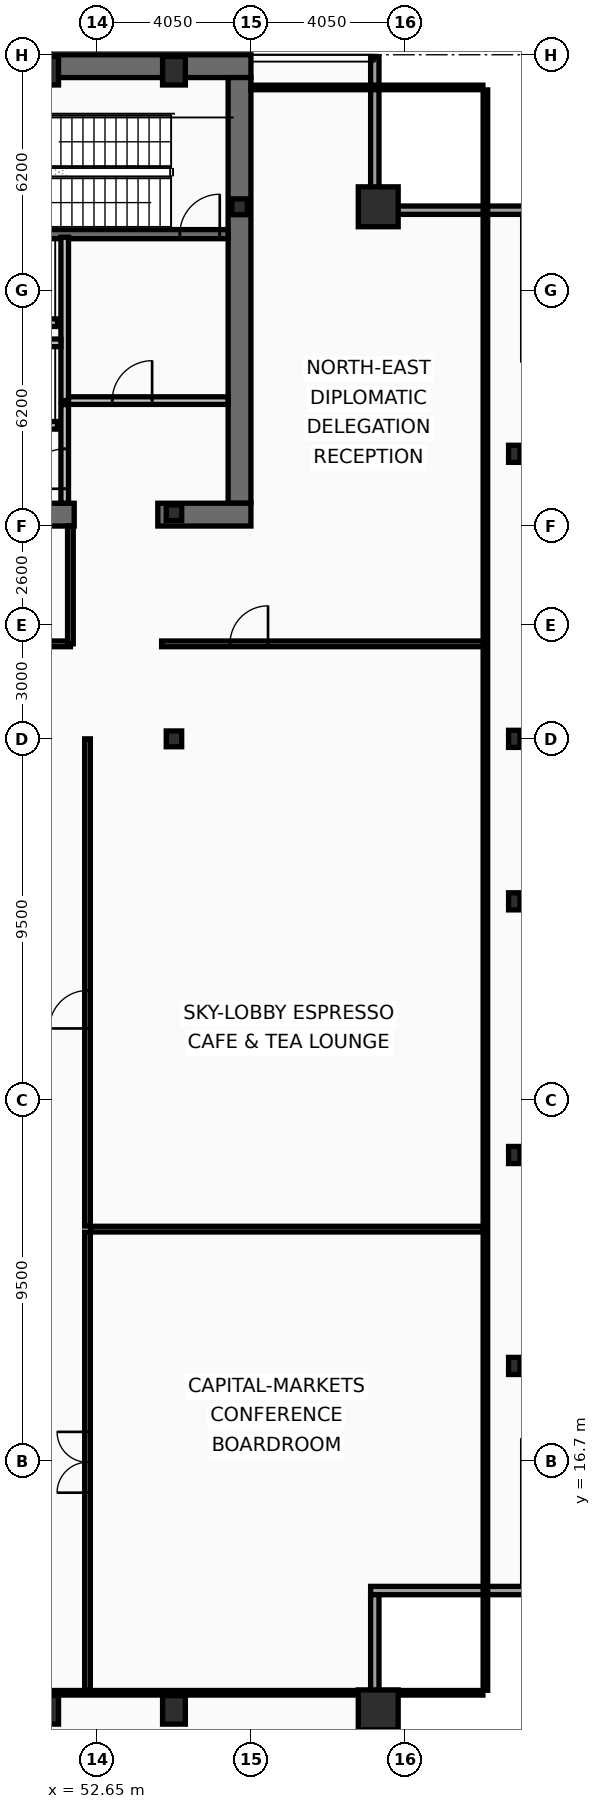
"""IFC4 building model, lengths in metres.
Left out: names, types, materials, properties, quantities, classifications, styles, units other than length and angle.
Written with IfcOpenShell. Run it as: python <this file> out.ifc"""

import sys

from ifc_helpers import new_model, si_unit, direction, frame, frame_2d, origin, origin_2d, place, context, subcontext, project, spatial, rectangle, hollow_rectangle, i_section, extrude, element, fill, save


model = new_model("IFC4")
c1 = context("Model", 3, precision=1e-05, world=origin(), true_north=direction((0.0, 1.0)))
c2 = subcontext(c1, "Body", "Model", "MODEL_VIEW")
j1 = project(units=[si_unit("LENGTHUNIT", "METRE"), si_unit("PLANEANGLEUNIT", "RADIAN")], contexts=[c1])
p1 = place(None, origin())
s1 = spatial("IfcSite", under=j1, at=p1, CompositionType="ELEMENT")
p2 = place(p1, origin())
s2 = spatial("IfcBuilding", under=s1, at=p2, CompositionType="ELEMENT")
p3 = place(p2, frame((0.0, 0.0, 265.4)))
s3 = spatial("IfcBuildingStorey", under=s2, at=p3, CompositionType="ELEMENT", Elevation=265.4)
p4 = place(p3, frame((16.2, 53.4, 0.0), z_axis=(0.0, 0.0, 1.0), x_axis=(1.0, 0.0, 0.0)))
e1 = element("IfcWall", 1, at=p4, inside=s3, PredefinedType="SHEAR", context=c2, shape_type="SweptSolid", body=[
    extrude(rectangle(XDim=40.5, YDim=0.6, at=frame_2d((20.25, 0.0))), origin(), (0.0, 0.0, 1.0), 4.24),
])
p5 = place(p3, frame((56.4, 53.1, 0.0), z_axis=(0.0, 0.0, 1.0), x_axis=(0.0, -1.0, 0.0)))
e2 = element("IfcWall", 2, at=p5, inside=s3, PredefinedType="SHEAR", context=c2, shape_type="SweptSolid", body=[
    extrude(rectangle(XDim=11.2, YDim=0.6, at=frame_2d((5.6, 0.0))), origin(), (0.0, 0.0, 1.0), 4.24),
])
p6 = place(p3, frame((52.05, 41.6, 0.0), z_axis=(0.0, 0.0, 1.0), x_axis=(-1.0, 0.0, 0.0)))
e3 = element("IfcWall", 3, at=p6, inside=s3, PredefinedType="SHEAR", context=c2, shape_type="SweptSolid", body=[
    extrude(rectangle(XDim=11.3, YDim=0.6, at=frame_2d((5.65, 0.0))), origin(), (0.0, 0.0, 1.0), 4.24),
])
p7 = place(p3, frame((56.7, 41.6, 0.0), z_axis=(0.0, 0.0, 1.0), x_axis=(-1.0, 0.0, 0.0)))
e4 = element("IfcWall", 4, at=p7, inside=s3, PredefinedType="SHEAR", context=c2, shape_type="SweptSolid", body=[
    extrude(rectangle(XDim=2.45, YDim=0.6, at=frame_2d((1.225, 0.0))), origin(), (0.0, 0.0, 1.0), 4.24),
])
p8 = place(p3, frame((48.63, 48.98, 0.0), z_axis=(0.0, 0.0, 1.0), x_axis=(1.0, 0.0, 0.0)))
e5 = element("IfcWall", 5, at=p8, inside=s3, PredefinedType="SHEAR", context=c2, shape_type="SweptSolid", body=[
    extrude(rectangle(XDim=7.47, YDim=0.24, at=frame_2d((3.735, 0.0))), origin(), (0.0, 0.0, 1.0), 4.24),
])
p9 = place(p8, frame((6.2, 0.0, 0.0)))
e6 = element("IfcOpeningElement", 6, at=p9, cuts=e5, PredefinedType="OPENING", context=c2, shape_type="SweptSolid", body=[
    extrude(rectangle(XDim=1.05, YDim=2.15, at=frame_2d((0.525, 1.075))), frame((0.0, 0.13, 0.0), z_axis=(0.0, -1.0, 0.0), x_axis=(1.0, 0.0, 0.0)), (0.0, 0.0, 1.0), 0.26),
])
for number, where, z_axis, x_axis in (
    (7, (60.05, 10.15, 0.0), (0.0, 0.0, 1.0), (1.0, 0.0, 0.0)),
    (8, (60.05, 49.7, 0.0), (0.0, 0.0, 1.0), (1.0, 0.0, 0.0)),
):
    element("IfcColumn", number, at=place(p3, frame(where, z_axis=z_axis, x_axis=x_axis)), inside=s3, PredefinedType="COLUMN", context=c2, shape_type="SweptSolid", body=[
        extrude(hollow_rectangle(XDim=1.05, YDim=1.05, WallThickness=0.055, at=origin_2d()), origin(), (0.0, 0.0, 1.0), 4.4),
    ])
for number, where, z_axis, x_axis in (
    (9, (51.337, 10.15, 0.0), (0.0, 0.0, 1.0), (1.0, 0.0, 0.0)),
    (10, (54.675, 10.15, 0.0), (0.0, 0.0, 1.0), (1.0, 0.0, 0.0)),
    (11, (51.337, 53.28, 0.0), (0.0, 0.0, 1.0), (1.0, 0.0, 0.0)),
    (12, (54.675, 53.28, 0.0), (0.0, 0.0, 1.0), (1.0, 0.0, 0.0)),
):
    element("IfcColumn", number, at=place(p3, frame(where, z_axis=z_axis, x_axis=x_axis)), inside=s3, PredefinedType="COLUMN", context=c2, shape_type="SweptSolid", body=[
        extrude(hollow_rectangle(XDim=0.6, YDim=0.75, WallThickness=0.045, at=origin_2d()), origin(), (0.0, 0.0, 1.0), 4.4),
    ])
for number, where, z_axis, x_axis in (
    (13, (63.63, 19.2, 0.0), (0.0, 0.0, 1.0), (1.0, 0.0, 0.0)),
    (14, (63.63, 24.75, 0.0), (0.0, 0.0, 1.0), (1.0, 0.0, 0.0)),
    (15, (63.63, 31.425, 0.0), (0.0, 0.0, 1.0), (1.0, 0.0, 0.0)),
    (16, (63.63, 35.7, 0.0), (0.0, 0.0, 1.0), (1.0, 0.0, 0.0)),
    (17, (63.63, 43.2, 0.0), (0.0, 0.0, 1.0), (1.0, 0.0, 0.0)),
):
    element("IfcColumn", number, at=place(p3, frame(where, z_axis=z_axis, x_axis=x_axis)), inside=s3, PredefinedType="COLUMN", context=c2, shape_type="SweptSolid", body=[
        extrude(i_section(OverallWidth=0.3, OverallDepth=0.45, WebThickness=0.014, FlangeThickness=0.026, at=origin_2d()), origin(), (0.0, 0.0, 1.0), 4.4),
    ])
for number, where, z_axis, x_axis in (
    (18, (56.4, 49.7, 0.0), (0.0, 0.0, 1.0), (1.0, 0.0, 0.0)),
    (19, (54.675, 35.7, 0.0), (0.0, 0.0, 1.0), (1.0, 0.0, 0.0)),
    (20, (54.675, 41.65, 0.0), (0.0, 0.0, 1.0), (1.0, 0.0, 0.0)),
):
    element("IfcColumn", number, at=place(p3, frame(where, z_axis=z_axis, x_axis=x_axis)), inside=s3, PredefinedType="COLUMN", context=c2, shape_type="SweptSolid", body=[
        extrude(i_section(OverallWidth=0.406, OverallDepth=0.416, WebThickness=0.03, FlangeThickness=0.048, at=origin_2d()), origin(), (0.0, 0.0, 1.0), 4.4),
    ])
p10 = place(p3, frame((59.96, 53.63, 0.0), z_axis=(0.0, 0.0, 1.0), x_axis=(0.0, -1.0, 0.0)))
e21 = element("IfcWall", 21, at=p10, inside=s3, PredefinedType="SOLIDWALL", context=c2, shape_type="SweptSolid", body=[
    extrude(rectangle(XDim=3.91, YDim=0.22, at=frame_2d((1.955, 0.0))), origin(), (0.0, 0.0, 1.0), 3.68),
])
for number, where, z_axis, x_axis in (
    (22, (59.85, 49.61, 0.0), (0.0, 0.0, 1.0), (1.0, 0.0, 0.0)),
    (23, (64.07, 13.29, 0.0), (0.0, 0.0, 1.0), (-1.0, 0.0, 0.0)),
):
    element("IfcWall", number, at=place(p3, frame(where, z_axis=z_axis, x_axis=x_axis)), inside=s3, PredefinedType="SOLIDWALL", context=c2, shape_type="SweptSolid", body=[
        extrude(rectangle(XDim=4.22, YDim=0.22, at=frame_2d((2.11, 0.0))), origin(), (0.0, 0.0, 1.0), 3.68),
    ])
p11 = place(p3, frame((59.96, 13.18, 0.0), z_axis=(0.0, 0.0, 1.0), x_axis=(0.0, -1.0, 0.0)))
e24 = element("IfcWall", 24, at=p11, inside=s3, PredefinedType="SOLIDWALL", context=c2, shape_type="SweptSolid", body=[
    extrude(rectangle(XDim=3.91, YDim=0.22, at=frame_2d((1.955, 0.0))), origin(), (0.0, 0.0, 1.0), 3.68),
])
p12 = place(p3, frame((51.61, 43.95, 0.0), z_axis=(0.0, 0.0, 1.0), x_axis=(-1.0, 0.0, 0.0)))
e25 = element("IfcWall", 25, at=p12, inside=s3, PredefinedType="PARTITIONING", context=c2, shape_type="SweptSolid", body=[
    extrude(rectangle(XDim=2.92, YDim=0.2, at=frame_2d((1.46, 0.0))), origin(), (0.0, 0.0, 1.0), 4.24),
])
p13 = place(p12, frame((0.81, 0.0, 0.0)))
e26 = element("IfcOpeningElement", 26, at=p13, cuts=e25, PredefinedType="OPENING", context=c2, shape_type="SweptSolid", body=[
    extrude(rectangle(XDim=1.3, YDim=2.18, at=frame_2d((0.65, 1.09))), frame((0.0, 0.11, 0.0), z_axis=(0.0, -1.0, 0.0), x_axis=(1.0, 0.0, 0.0)), (0.0, 0.0, 1.0), 0.22),
])
p14 = place(p3, frame((51.61, 46.65, 0.0), z_axis=(0.0, 0.0, 1.0), x_axis=(-1.0, 0.0, 0.0)))
e27 = element("IfcWall", 27, at=p14, inside=s3, PredefinedType="PARTITIONING", context=c2, shape_type="SweptSolid", body=[
    extrude(rectangle(XDim=2.92, YDim=0.2, at=frame_2d((1.46, 0.0))), origin(), (0.0, 0.0, 1.0), 4.24),
])
p15 = place(p14, frame((0.86, 0.0, 0.0)))
e28 = element("IfcOpeningElement", 28, at=p15, cuts=e27, PredefinedType="OPENING", context=c2, shape_type="SweptSolid", body=[
    extrude(rectangle(XDim=1.2, YDim=2.18, at=frame_2d((0.6, 1.09))), frame((0.0, 0.11, 0.0), z_axis=(0.0, -1.0, 0.0), x_axis=(1.0, 0.0, 0.0)), (0.0, 0.0, 1.0), 0.22),
])
p16 = place(p3, frame((51.8, 44.6, 0.0), z_axis=(0.0, 0.0, 1.0), x_axis=(0.0, 1.0, 0.0)))
e29 = element("IfcWall", 29, at=p16, inside=s3, PredefinedType="PARTITIONING", context=c2, shape_type="SweptSolid", body=[
    extrude(rectangle(XDim=4.3, YDim=0.2, at=frame_2d((2.15, 0.0))), origin(), (0.0, 0.0, 1.0), 4.24),
])
p17 = place(p3, frame((51.9, 44.6, 0.0), z_axis=(0.0, 0.0, 1.0), x_axis=(1.0, 0.0, 0.0)))
e30 = element("IfcWall", 30, at=p17, inside=s3, PredefinedType="PARTITIONING", context=c2, shape_type="SweptSolid", body=[
    extrude(rectangle(XDim=4.2, YDim=0.2, at=frame_2d((2.1, 0.0))), origin(), (0.0, 0.0, 1.0), 4.24),
])
p18 = place(p17, frame((1.15, 0.0, 0.0)))
e31 = element("IfcOpeningElement", 31, at=p18, cuts=e30, PredefinedType="OPENING", context=c2, shape_type="SweptSolid", body=[
    extrude(rectangle(XDim=1.05, YDim=2.15, at=frame_2d((0.525, 1.075))), frame((0.0, 0.11, 0.0), z_axis=(0.0, -1.0, 0.0), x_axis=(1.0, 0.0, 0.0)), (0.0, 0.0, 1.0), 0.22),
])
p19 = place(p3, frame((48.63, 46.12, 0.0), z_axis=(0.0, 0.0, 1.0), x_axis=(1.0, 0.0, 0.0)))
e32 = element("IfcWall", 32, at=p19, inside=s3, PredefinedType="PARTITIONING", context=c2, shape_type="SweptSolid", body=[
    extrude(rectangle(XDim=3.07, YDim=0.2, at=frame_2d((1.535, 0.0))), origin(), (0.0, 0.0, 1.0), 4.24),
])
p20 = place(p3, frame((51.8, 41.9, 0.0), z_axis=(0.0, 0.0, 1.0), x_axis=(0.0, 1.0, 0.0)))
e33 = element("IfcWall", 33, at=p20, inside=s3, PredefinedType="PARTITIONING", context=c2, shape_type="SweptSolid", body=[
    extrude(rectangle(XDim=2.595, YDim=0.2, at=frame_2d((1.298, 0.0))), origin(), (0.0, 0.0, 1.0), 4.24),
])
p21 = place(p20, frame((0.38, 0.0, 0.0)))
e34 = element("IfcOpeningElement", 34, at=p21, cuts=e33, PredefinedType="OPENING", context=c2, shape_type="SweptSolid", body=[
    extrude(rectangle(XDim=1.05, YDim=2.15, at=frame_2d((0.525, 1.075))), frame((0.0, 0.11, 0.0), z_axis=(0.0, -1.0, 0.0), x_axis=(1.0, 0.0, 0.0)), (0.0, 0.0, 1.0), 0.22),
])
p22 = place(p3, frame((52.4, 10.665, 0.0), z_axis=(0.0, 0.0, 1.0), x_axis=(0.0, 1.0, 0.0)))
e35 = element("IfcWall", 35, at=p22, inside=s3, PredefinedType="PARTITIONING", context=c2, shape_type="SweptSolid", body=[
    extrude(rectangle(XDim=12.055, YDim=0.15, at=frame_2d((6.027, 0.0))), origin(), (0.0, 0.0, 1.0), 3.83),
])
p23 = place(p22, frame((5.2, 0.0, 0.0)))
e36 = element("IfcOpeningElement", 36, at=p23, cuts=e35, PredefinedType="OPENING", context=c2, shape_type="SweptSolid", body=[
    extrude(rectangle(XDim=1.6, YDim=2.15, at=frame_2d((0.8, 1.075))), frame((0.0, 0.085, 0.0), z_axis=(0.0, -1.0, 0.0), x_axis=(1.0, 0.0, 0.0)), (0.0, 0.0, 1.0), 0.17),
])
p24 = place(p3, frame((52.4, 22.88, 0.0), z_axis=(0.0, 0.0, 1.0), x_axis=(0.0, 1.0, 0.0)))
e37 = element("IfcWall", 37, at=p24, inside=s3, PredefinedType="PARTITIONING", context=c2, shape_type="SweptSolid", body=[
    extrude(rectangle(XDim=12.82, YDim=0.15, at=frame_2d((6.41, 0.0))), origin(), (0.0, 0.0, 1.0), 3.83),
])
p25 = place(p24, frame((5.2, 0.0, 0.0)))
e38 = element("IfcOpeningElement", 38, at=p25, cuts=e37, PredefinedType="OPENING", context=c2, shape_type="SweptSolid", body=[
    extrude(rectangle(XDim=1.0, YDim=2.05, at=frame_2d((0.5, 1.025))), frame((0.0, 0.085, 0.0), z_axis=(0.0, -1.0, 0.0), x_axis=(1.0, 0.0, 0.0)), (0.0, 0.0, 1.0), 0.17),
])
p26 = place(p3, frame((52.48, 22.8, 0.0), z_axis=(0.0, 0.0, 1.0), x_axis=(1.0, 0.0, 0.0)))
e39 = element("IfcWall", 39, at=p26, inside=s3, PredefinedType="PARTITIONING", context=c2, shape_type="SweptSolid", body=[
    extrude(rectangle(XDim=10.325, YDim=0.15, at=frame_2d((5.163, 0.0))), origin(), (0.0, 0.0, 1.0), 3.58),
])
p27 = place(p3, frame((46.6, 38.2, 0.0), z_axis=(0.0, 0.0, 1.0), x_axis=(1.0, 0.0, 0.0)))
e40 = element("IfcWall", 40, at=p27, inside=s3, PredefinedType="PARTITIONING", context=c2, shape_type="SweptSolid", body=[
    extrude(rectangle(XDim=5.35, YDim=0.15, at=frame_2d((2.675, 0.0))), origin(), (0.0, 0.0, 1.0), 3.58),
])
p28 = place(p27, frame((2.0, 0.0, 0.0)))
e41 = element("IfcOpeningElement", 41, at=p28, cuts=e40, PredefinedType="OPENING", context=c2, shape_type="SweptSolid", body=[
    extrude(rectangle(XDim=0.9, YDim=2.05, at=frame_2d((0.45, 1.025))), frame((0.0, 0.085, 0.0), z_axis=(0.0, -1.0, 0.0), x_axis=(1.0, 0.0, 0.0)), (0.0, 0.0, 1.0), 0.17),
])
p29 = place(p3, frame((51.95, 38.2, 0.0), z_axis=(0.0, 0.0, 1.0), x_axis=(0.0, 1.0, 0.0)))
e42 = element("IfcWall", 42, at=p29, inside=s3, PredefinedType="PARTITIONING", context=c2, shape_type="SweptSolid", body=[
    extrude(rectangle(XDim=3.1, YDim=0.15, at=frame_2d((1.55, 0.0))), origin(), (0.0, 0.0, 1.0), 4.24),
])
p30 = place(p3, frame((54.35, 38.2, 0.0), z_axis=(0.0, 0.0, 1.0), x_axis=(1.0, 0.0, 0.0)))
e43 = element("IfcWall", 43, at=p30, inside=s3, PredefinedType="PARTITIONING", context=c2, shape_type="SweptSolid", body=[
    extrude(rectangle(XDim=8.52, YDim=0.15, at=frame_2d((4.26, 0.0))), origin(), (0.0, 0.0, 1.0), 3.58),
])
p31 = place(p30, frame((1.8, 0.0, 0.0)))
e44 = element("IfcOpeningElement", 44, at=p31, cuts=e43, PredefinedType="OPENING", context=c2, shape_type="SweptSolid", body=[
    extrude(rectangle(XDim=1.0, YDim=2.05, at=frame_2d((0.5, 1.025))), frame((0.0, 0.085, 0.0), z_axis=(0.0, -1.0, 0.0), x_axis=(1.0, 0.0, 0.0)), (0.0, 0.0, 1.0), 0.17),
])
p32 = place(p3, frame((62.87, 10.665, 0.0), z_axis=(0.0, 0.0, 1.0), x_axis=(0.0, 1.0, 0.0)))
e45 = element("IfcWall", 45, at=p32, inside=s3, PredefinedType="PARTITIONING", context=c2, shape_type="SweptSolid", body=[
    extrude(rectangle(XDim=42.11, YDim=0.12, at=frame_2d((21.055, 0.0))), origin(), (0.0, 0.0, 1.0), 3.58),
])
p33 = place(p3, frame((56.7, 52.84, 0.0), z_axis=(0.0, 0.0, 1.0), x_axis=(1.0, 0.0, 0.0)))
e46 = element("IfcWall", 46, at=p33, inside=s3, PredefinedType="PARTITIONING", context=c2, shape_type="SweptSolid", body=[
    extrude(rectangle(XDim=6.105, YDim=0.12, at=frame_2d((3.052, 0.0))), origin(), (0.0, 0.0, 1.0), 4.24),
])
p34 = place(p3, frame((10.095, 10.6, 0.0), z_axis=(0.0, 0.0, 1.0), x_axis=(1.0, 0.0, 0.0)))
e47 = element("IfcWall", 47, at=p34, inside=s3, PredefinedType="PARTITIONING", context=c2, shape_type="SweptSolid", body=[
    extrude(rectangle(XDim=52.71, YDim=0.12, at=frame_2d((26.355, 0.0))), origin(), (0.0, 0.0, 1.0), 3.58),
])
p35 = place(p9, origin())
e48 = element("IfcDoor", 48, at=p35, inside=s3, OperationType="SINGLE_SWING_RIGHT", PredefinedType="DOOR", context=c2, shape_type="SweptSolid", body=[
    extrude(rectangle(XDim=1.05, YDim=2.15, at=frame_2d((0.525, 1.075))), frame((0.0, 0.025, 0.0), z_axis=(0.0, -1.0, 0.0), x_axis=(1.0, 0.0, 0.0)), (0.0, 0.0, 1.0), 0.05),
])
fill(e6, e48)
p36 = place(p18, origin())
e49 = element("IfcDoor", 49, at=p36, inside=s3, OperationType="SINGLE_SWING_RIGHT", PredefinedType="DOOR", context=c2, shape_type="SweptSolid", body=[
    extrude(rectangle(XDim=1.05, YDim=2.15, at=frame_2d((0.525, 1.075))), frame((0.0, 0.025, 0.0), z_axis=(0.0, -1.0, 0.0), x_axis=(1.0, 0.0, 0.0)), (0.0, 0.0, 1.0), 0.05),
])
fill(e31, e49)
p37 = place(p21, origin())
e50 = element("IfcDoor", 50, at=p37, inside=s3, OperationType="SINGLE_SWING_LEFT", PredefinedType="DOOR", context=c2, shape_type="SweptSolid", body=[
    extrude(rectangle(XDim=1.05, YDim=2.15, at=frame_2d((0.525, 1.075))), frame((0.0, 0.025, 0.0), z_axis=(0.0, -1.0, 0.0), x_axis=(1.0, 0.0, 0.0)), (0.0, 0.0, 1.0), 0.05),
])
fill(e34, e50)
p38 = place(p23, origin())
e51 = element("IfcDoor", 51, at=p38, inside=s3, OperationType="DOUBLE_DOOR_SINGLE_SWING", PredefinedType="DOOR", context=c2, shape_type="SweptSolid", body=[
    extrude(rectangle(XDim=1.6, YDim=2.15, at=frame_2d((0.8, 1.075))), frame((0.0, 0.025, 0.0), z_axis=(0.0, -1.0, 0.0), x_axis=(1.0, 0.0, 0.0)), (0.0, 0.0, 1.0), 0.05),
])
fill(e36, e51)
p39 = place(p25, origin())
e52 = element("IfcDoor", 52, at=p39, inside=s3, OperationType="SINGLE_SWING_LEFT", PredefinedType="DOOR", context=c2, shape_type="SweptSolid", body=[
    extrude(rectangle(XDim=1.0, YDim=2.05, at=frame_2d((0.5, 1.025))), frame((0.0, 0.025, 0.0), z_axis=(0.0, -1.0, 0.0), x_axis=(1.0, 0.0, 0.0)), (0.0, 0.0, 1.0), 0.05),
])
fill(e38, e52)
p40 = place(p31, origin())
e53 = element("IfcDoor", 53, at=p40, inside=s3, OperationType="SINGLE_SWING_RIGHT", PredefinedType="DOOR", context=c2, shape_type="SweptSolid", body=[
    extrude(rectangle(XDim=1.0, YDim=2.05, at=frame_2d((0.5, 1.025))), frame((0.0, 0.025, 0.0), z_axis=(0.0, -1.0, 0.0), x_axis=(1.0, 0.0, 0.0)), (0.0, 0.0, 1.0), 0.05),
])
fill(e44, e53)
save(model, sys.argv[1])
